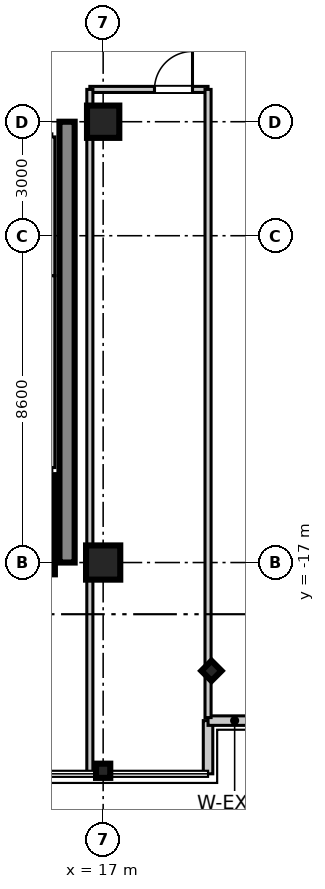
"""IFC4 building model, lengths in metres.
Left out: names, types, materials, properties, quantities, classifications, styles, units other than length and angle.
Written with IfcOpenShell. Run it as: python <this file> out.ifc"""

import sys

from ifc_helpers import new_model, si_unit, direction, frame, frame_2d, origin, origin_2d, place, context, subcontext, project, spatial, rectangle, i_section, extrude, source, transform, mapped, element, fill, save


model = new_model("IFC4")
c1 = context("Model", 3, precision=1e-05, world=origin(), true_north=direction((0.0, 1.0)))
c2 = subcontext(c1, "Body", "Model", "MODEL_VIEW")
j1 = project(units=[si_unit("LENGTHUNIT", "METRE"), si_unit("PLANEANGLEUNIT", "RADIAN")], contexts=[c1])
p1 = place(None, origin())
s1 = spatial("IfcSite", under=j1, at=p1, CompositionType="ELEMENT")
p2 = place(p1, origin())
s2 = spatial("IfcBuilding", under=s1, at=p2, CompositionType="ELEMENT")
p3 = place(p2, frame((0.0, 0.0, 281.3)))
s3 = spatial("IfcBuildingStorey", under=s2, at=p3, CompositionType="ELEMENT", Elevation=281.3)
m1 = source(origin(), c2, "Body", "SweptSolid", [
    extrude(rectangle(XDim=0.9, YDim=0.9, at=origin_2d()), origin(), (0.0, 0.0, 1.0), 3.705),
])
p4 = place(p3, frame((17.0, -17.0, 0.0), z_axis=(0.0, 0.0, 1.0), x_axis=(1.0, 0.0, 0.0)))
e1 = element("IfcColumn", 1, at=p4, inside=s3, PredefinedType="COLUMN", context=c2, shape_type="MappedRepresentation", body=[
    mapped(m1, transform((0.0, 0.0, 0.0), scale=1.0)),
])
m2 = source(origin(), c2, "Body", "SweptSolid", [
    extrude(rectangle(XDim=0.85, YDim=0.85, at=origin_2d()), origin(), (0.0, 0.0, 1.0), 3.705),
])
p5 = place(p3, frame((17.0, -5.4, 0.0), z_axis=(0.0, 0.0, 1.0), x_axis=(1.0, 0.0, 0.0)))
e2 = element("IfcColumn", 2, at=p5, inside=s3, PredefinedType="PILASTER", context=c2, shape_type="MappedRepresentation", body=[
    mapped(m2, transform((0.0, 0.0, 0.0), scale=1.0)),
])
m3 = source(origin(), c2, "Body", "SweptSolid", [
    extrude(i_section(OverallWidth=0.374, OverallDepth=0.374, WebThickness=0.014, FlangeThickness=0.023, at=origin_2d()), origin(), (0.0, 0.0, 1.0), 3.705),
])
for number, where, z_axis, x_axis in (
    (3, (17.0, -22.48, 0.0), (0.0, 0.0, 1.0), (0.0, 1.0, 0.0)),
    (4, (19.85, -19.85, 0.0), (0.0, 0.0, 1.0), (0.707, 0.707, 0.0)),
):
    element("IfcColumn", number, at=place(p3, frame(where, z_axis=z_axis, x_axis=x_axis)), inside=s3, PredefinedType="COLUMN", context=c2, shape_type="MappedRepresentation", body=[
        mapped(m3, transform((0.0, 0.0, 0.0), scale=1.0)),
    ])
m4 = source(origin(), c2, "Body", "SweptSolid", [
    extrude(rectangle(XDim=11.6, YDim=0.4, at=frame_2d((5.8, 0.0))), origin(), (0.0, 0.0, 1.0), 3.45),
])
p6 = place(p3, frame((16.05, -17.0, 0.0), z_axis=(0.0, 0.0, 1.0), x_axis=(0.0, 1.0, 0.0)))
e5 = element("IfcWall", 5, at=p6, inside=s3, PredefinedType="SHEAR", context=c2, shape_type="MappedRepresentation", body=[
    mapped(m4, transform((0.0, 0.0, 0.0), scale=1.0)),
])
m5 = source(origin(), c2, "Body", "SweptSolid", [
    extrude(rectangle(XDim=2.61, YDim=0.22, at=frame_2d((1.305, 0.0))), origin(), (0.0, 0.0, 1.0), 3.45),
])
p7 = place(p3, frame((15.62, -17.31, 0.0), z_axis=(0.0, 0.0, 1.0), x_axis=(0.0, 1.0, 0.0)))
e6 = element("IfcWall", 6, at=p7, inside=s3, PredefinedType="SHEAR", context=c2, shape_type="MappedRepresentation", body=[
    mapped(m5, transform((0.0, 0.0, 0.0), scale=1.0)),
])
m6 = source(origin(), c2, "Body", "SweptSolid", [
    extrude(rectangle(XDim=1.4, YDim=0.25, at=frame_2d((0.7, 0.0))), origin(), (0.0, 0.0, 1.0), 3.45),
])
p8 = place(p3, frame((19.76, -22.56, 0.0), z_axis=(0.0, 0.0, 1.0), x_axis=(0.0, 1.0, 0.0)))
e7 = element("IfcWall", 7, at=p8, inside=s3, PredefinedType="STANDARD", context=c2, shape_type="MappedRepresentation", body=[
    mapped(m6, transform((0.0, 0.0, 0.0), scale=1.0)),
])
m7 = source(origin(), c2, "Body", "SweptSolid", [
    extrude(rectangle(XDim=1.4, YDim=0.25, at=frame_2d((0.7, 0.0))), origin(), (0.0, 0.0, 1.0), 3.45),
])
p9 = place(p3, frame((19.76, -21.16, 0.0), z_axis=(0.0, 0.0, 1.0), x_axis=(1.0, 0.0, 0.0)))
e8 = element("IfcWall", 8, at=p9, inside=s3, PredefinedType="STANDARD", context=c2, shape_type="MappedRepresentation", body=[
    mapped(m7, transform((0.0, 0.0, 0.0), scale=1.0)),
])
m8 = source(origin(), c2, "Body", "SweptSolid", [
    extrude(rectangle(XDim=5.05, YDim=0.16, at=frame_2d((2.525, 0.0))), origin(), (0.0, 0.0, 1.0), 2.79),
])
p10 = place(p3, frame((15.65, -14.5, 0.0), z_axis=(0.0, 0.0, 1.0), x_axis=(0.0, 1.0, 0.0)))
e9 = element("IfcWall", 9, at=p10, inside=s3, PredefinedType="PARTITIONING", context=c2, shape_type="MappedRepresentation", body=[
    mapped(m8, transform((0.0, 0.0, 0.0), scale=1.0)),
])
m9 = source(origin(), c2, "Body", "SweptSolid", [
    extrude(rectangle(XDim=3.65, YDim=0.16, at=frame_2d((1.825, 0.0))), origin(), (0.0, 0.0, 1.0), 2.79),
])
p11 = place(p3, frame((15.65, -9.45, 0.0), z_axis=(0.0, 0.0, 1.0), x_axis=(0.0, 1.0, 0.0)))
e10 = element("IfcWall", 10, at=p11, inside=s3, PredefinedType="PARTITIONING", context=c2, shape_type="MappedRepresentation", body=[
    mapped(m9, transform((0.0, 0.0, 0.0), scale=1.0)),
])
m10 = source(origin(), c2, "Body", "SweptSolid", [
    extrude(rectangle(XDim=3.11, YDim=0.16, at=frame_2d((1.555, 0.0))), origin(), (0.0, 0.0, 1.0), 2.79),
])
p12 = place(p3, frame((16.65, -4.55, 0.0), z_axis=(0.0, 0.0, 1.0), x_axis=(1.0, 0.0, 0.0)))
e11 = element("IfcWall", 11, at=p12, inside=s3, PredefinedType="PARTITIONING", context=c2, shape_type="MappedRepresentation", body=[
    mapped(m10, transform((0.0, 0.0, 0.0), scale=1.0)),
])
p13 = place(p12, frame((1.701, 0.0, 0.0)))
e12 = element("IfcOpeningElement", 12, at=p13, cuts=e11, PredefinedType="OPENING", context=c2, shape_type="SweptSolid", body=[
    extrude(rectangle(XDim=1.0, YDim=2.1, at=frame_2d((0.5, 1.05))), frame((0.0, 0.09, 0.0), z_axis=(0.0, -1.0, 0.0), x_axis=(1.0, 0.0, 0.0)), (0.0, 0.0, 1.0), 0.18),
])
m11 = source(origin(), c2, "Body", "SweptSolid", [
    extrude(rectangle(XDim=17.95, YDim=0.16, at=frame_2d((8.975, 0.0))), origin(), (0.0, 0.0, 1.0), 2.79),
])
p14 = place(p3, frame((16.65, -22.5, 0.0), z_axis=(0.0, 0.0, 1.0), x_axis=(0.0, 1.0, 0.0)))
e13 = element("IfcWall", 13, at=p14, inside=s3, PredefinedType="PARTITIONING", context=c2, shape_type="MappedRepresentation", body=[
    mapped(m11, transform((0.0, 0.0, 0.0), scale=1.0)),
])
m12 = source(origin(), c2, "Body", "SweptSolid", [
    extrude(rectangle(XDim=16.53, YDim=0.16, at=frame_2d((8.265, 0.0))), origin(), (0.0, 0.0, 1.0), 2.79),
])
p15 = place(p3, frame((19.76, -21.08, 0.0), z_axis=(0.0, 0.0, 1.0), x_axis=(0.0, 1.0, 0.0)))
e14 = element("IfcWall", 14, at=p15, inside=s3, PredefinedType="PARTITIONING", context=c2, shape_type="MappedRepresentation", body=[
    mapped(m12, transform((0.0, 0.0, 0.0), scale=1.0)),
])
m13 = source(origin(), c2, "Body", "SweptSolid", [
    extrude(rectangle(XDim=1.0, YDim=2.1, at=frame_2d((0.5, 1.05))), frame((0.0, 0.025, 0.0), z_axis=(0.0, -1.0, 0.0), x_axis=(1.0, 0.0, 0.0)), (0.0, 0.0, 1.0), 0.05),
])
p16 = place(p13, frame((1.0, 0.0, 0.0), z_axis=(0.0, 0.0, 1.0), x_axis=(-1.0, 0.0, 0.0)))
e15 = element("IfcDoor", 15, at=p16, inside=s3, OperationType="SINGLE_SWING_RIGHT", PredefinedType="DOOR", context=c2, shape_type="MappedRepresentation", body=[
    mapped(m13, transform((0.0, 0.0, 0.0), scale=1.0)),
])
fill(e12, e15)
save(model, sys.argv[1])
